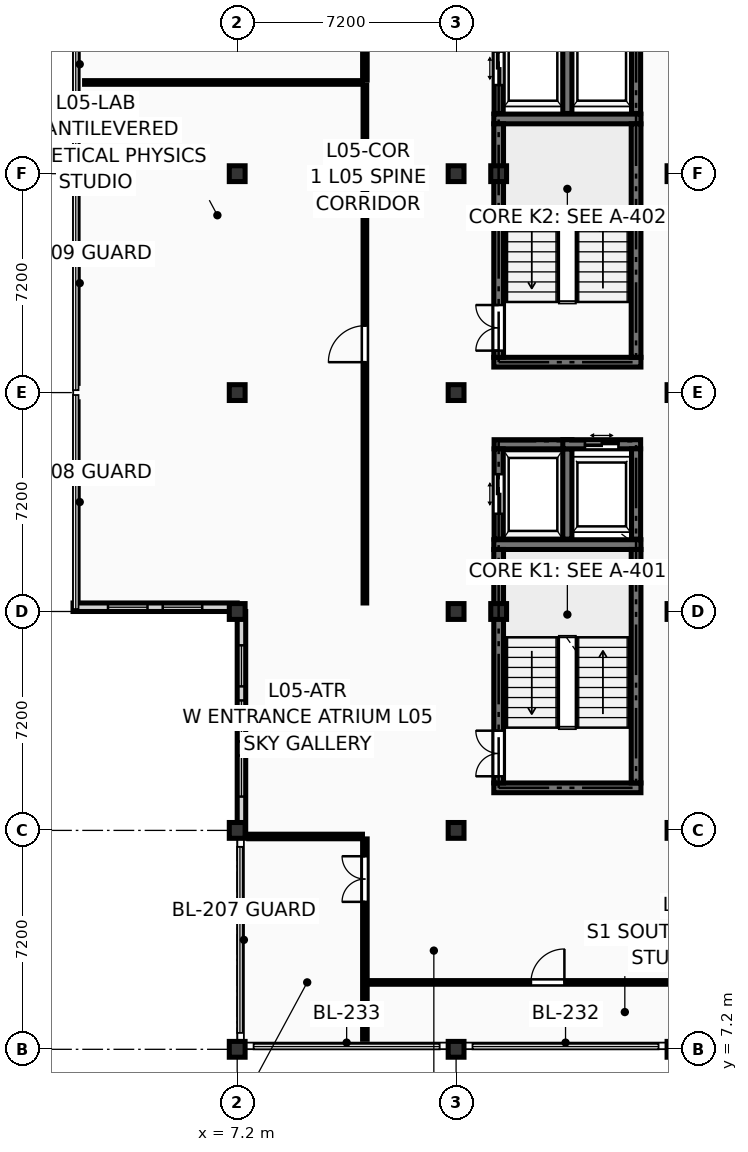
"""IFC4 building model, lengths in metres.
Left out: names, types, materials, properties, quantities, classifications, styles, units other than length and angle.
Written with IfcOpenShell. Run it as: python <this file> out.ifc"""

import sys

from ifc_helpers import new_model, si_unit, direction, frame, frame_2d, origin, origin_2d, place, context, subcontext, project, spatial, rectangle, extrude, element, fill, save


model = new_model("IFC4")
c1 = context("Model", 3, precision=1e-05, world=origin(), true_north=direction((0.0, 1.0)))
c2 = subcontext(c1, "Body", "Model", "MODEL_VIEW")
j1 = project(units=[si_unit("LENGTHUNIT", "METRE"), si_unit("PLANEANGLEUNIT", "RADIAN")], contexts=[c1])
p1 = place(None, origin())
s1 = spatial("IfcSite", under=j1, at=p1, CompositionType="ELEMENT")
p2 = place(p1, origin())
s2 = spatial("IfcBuilding", under=s1, at=p2, CompositionType="ELEMENT")
p3 = place(p2, frame((0.0, 0.0, 19.35)))
s3 = spatial("IfcBuildingStorey", under=s2, at=p3, CompositionType="ELEMENT", Elevation=19.35)
for number, where, z_axis, x_axis in (
    (1, (7.2, 7.2, 0.0), (0.0, 0.0, 1.0), (1.0, 0.0, 0.0)),
    (2, (7.2, 14.4, 0.0), (0.0, 0.0, 1.0), (1.0, 0.0, 0.0)),
    (3, (7.2, 21.6, 0.0), (0.0, 0.0, 1.0), (1.0, 0.0, 0.0)),
    (4, (7.2, 28.8, 0.0), (0.0, 0.0, 1.0), (1.0, 0.0, 0.0)),
    (5, (7.2, 36.0, 0.0), (0.0, 0.0, 1.0), (1.0, 0.0, 0.0)),
    (6, (14.4, 7.2, 0.0), (0.0, 0.0, 1.0), (1.0, 0.0, 0.0)),
    (7, (14.4, 14.4, 0.0), (0.0, 0.0, 1.0), (1.0, 0.0, 0.0)),
    (8, (14.4, 21.6, 0.0), (0.0, 0.0, 1.0), (1.0, 0.0, 0.0)),
    (9, (14.4, 28.8, 0.0), (0.0, 0.0, 1.0), (1.0, 0.0, 0.0)),
    (10, (14.4, 36.0, 0.0), (0.0, 0.0, 1.0), (1.0, 0.0, 0.0)),
    (11, (15.8, 21.6, 0.0), (0.0, 0.0, 1.0), (1.0, 0.0, 0.0)),
    (12, (15.8, 36.0, 0.0), (0.0, 0.0, 1.0), (1.0, 0.0, 0.0)),
    (13, (21.6, 7.2, 0.0), (0.0, 0.0, 1.0), (1.0, 0.0, 0.0)),
    (14, (21.6, 14.4, 0.0), (0.0, 0.0, 1.0), (1.0, 0.0, 0.0)),
    (15, (21.6, 21.6, 0.0), (0.0, 0.0, 1.0), (1.0, 0.0, 0.0)),
    (16, (21.6, 28.8, 0.0), (0.0, 0.0, 1.0), (1.0, 0.0, 0.0)),
    (17, (21.6, 36.0, 0.0), (0.0, 0.0, 1.0), (1.0, 0.0, 0.0)),
):
    element("IfcColumn", number, at=place(p3, frame(where, z_axis=z_axis, x_axis=x_axis)), inside=s3, PredefinedType="COLUMN", context=c2, shape_type="SweptSolid", body=[
        extrude(rectangle(XDim=0.52, YDim=0.52, at=origin_2d()), origin(), (0.0, 0.0, 1.0), 3.6),
    ])
p4 = place(p3, frame((7.34, 14.4, 0.0), z_axis=(0.0, 0.0, 1.0), x_axis=(0.0, 1.0, 0.0)))
e18 = element("IfcWall", 18, at=p4, inside=s3, PredefinedType="SOLIDWALL", context=c2, shape_type="SweptSolid", body=[
    extrude(rectangle(XDim=7.2, YDim=0.28, at=frame_2d((3.6, 0.0))), origin(), (0.0, 0.0, 1.0), 2.84),
])
p5 = place(p4, frame((1.113, 0.0, 0.18)))
e19 = element("IfcOpeningElement", 19, at=p5, cuts=e18, PredefinedType="OPENING", context=c2, shape_type="SweptSolid", body=[
    extrude(rectangle(XDim=1.35, YDim=2.45, at=frame_2d((0.675, 1.225))), frame((0.0, 0.152, 0.0), z_axis=(0.0, -1.0, 0.0), x_axis=(1.0, 0.0, 0.0)), (0.0, 0.0, 1.0), 0.304),
])
p6 = place(p4, frame((2.925, 0.0, 0.18)))
e20 = element("IfcOpeningElement", 20, at=p6, cuts=e18, PredefinedType="OPENING", context=c2, shape_type="SweptSolid", body=[
    extrude(rectangle(XDim=1.35, YDim=2.45, at=frame_2d((0.675, 1.225))), frame((0.0, 0.152, 0.0), z_axis=(0.0, -1.0, 0.0), x_axis=(1.0, 0.0, 0.0)), (0.0, 0.0, 1.0), 0.304),
])
p7 = place(p4, frame((4.738, 0.0, 0.18)))
e21 = element("IfcOpeningElement", 21, at=p7, cuts=e18, PredefinedType="OPENING", context=c2, shape_type="SweptSolid", body=[
    extrude(rectangle(XDim=1.35, YDim=2.45, at=frame_2d((0.675, 1.225))), frame((0.0, 0.152, 0.0), z_axis=(0.0, -1.0, 0.0), x_axis=(1.0, 0.0, 0.0)), (0.0, 0.0, 1.0), 0.304),
])
p8 = place(p3, frame((1.8, 21.74, 0.0), z_axis=(0.0, 0.0, 1.0), x_axis=(1.0, 0.0, 0.0)))
e22 = element("IfcWall", 22, at=p8, inside=s3, PredefinedType="SOLIDWALL", context=c2, shape_type="SweptSolid", body=[
    extrude(rectangle(XDim=5.4, YDim=0.28, at=frame_2d((2.7, 0.0))), origin(), (0.0, 0.0, 1.0), 2.696),
])
p9 = place(p8, frame((1.15, 0.0, 0.18)))
e23 = element("IfcOpeningElement", 23, at=p9, cuts=e22, PredefinedType="OPENING", context=c2, shape_type="SweptSolid", body=[
    extrude(rectangle(XDim=1.3, YDim=2.35, at=frame_2d((0.65, 1.175))), frame((0.0, 0.152, 0.0), z_axis=(0.0, -1.0, 0.0), x_axis=(1.0, 0.0, 0.0)), (0.0, 0.0, 1.0), 0.304),
])
p10 = place(p8, frame((2.95, 0.0, 0.18)))
e24 = element("IfcOpeningElement", 24, at=p10, cuts=e22, PredefinedType="OPENING", context=c2, shape_type="SweptSolid", body=[
    extrude(rectangle(XDim=1.3, YDim=2.35, at=frame_2d((0.65, 1.175))), frame((0.0, 0.152, 0.0), z_axis=(0.0, -1.0, 0.0), x_axis=(1.0, 0.0, 0.0)), (0.0, 0.0, 1.0), 0.304),
])
for number, where, z_axis, x_axis in (
    (25, (15.64, 15.8, 0.0), (0.0, 0.0, 1.0), (1.0, 0.0, 0.0)),
    (26, (15.64, 23.8, 0.0), (0.0, 0.0, 1.0), (1.0, 0.0, 0.0)),
):
    element("IfcWall", number, at=place(p3, frame(where, z_axis=z_axis, x_axis=x_axis)), inside=s3, PredefinedType="SHEAR", context=c2, shape_type="SweptSolid", body=[
        extrude(rectangle(XDim=4.84, YDim=0.32, at=frame_2d((2.42, 0.0))), origin(), (0.0, 0.0, 1.0), 3.39),
    ])
p11 = place(p3, frame((15.8, 15.96, 0.0), z_axis=(0.0, 0.0, 1.0), x_axis=(0.0, 1.0, 0.0)))
e27 = element("IfcWall", 27, at=p11, inside=s3, PredefinedType="SHEAR", context=c2, shape_type="SweptSolid", body=[
    extrude(rectangle(XDim=7.68, YDim=0.32, at=frame_2d((3.84, 0.0))), origin(), (0.0, 0.0, 1.0), 3.39),
])
p12 = place(p11, frame((0.22, 0.0, 0.0)))
e28 = element("IfcOpeningElement", 28, at=p12, cuts=e27, PredefinedType="OPENING", context=c2, shape_type="SweptSolid", body=[
    extrude(rectangle(XDim=1.5, YDim=2.2, at=frame_2d((0.75, 1.1))), frame((0.0, 0.172, 0.0), z_axis=(0.0, -1.0, 0.0), x_axis=(1.0, 0.0, 0.0)), (0.0, 0.0, 1.0), 0.344),
])
p13 = place(p3, frame((20.32, 15.96, 0.0), z_axis=(0.0, 0.0, 1.0), x_axis=(0.0, 1.0, 0.0)))
e29 = element("IfcWall", 29, at=p13, inside=s3, PredefinedType="SHEAR", context=c2, shape_type="SweptSolid", body=[
    extrude(rectangle(XDim=7.68, YDim=0.32, at=frame_2d((3.84, 0.0))), origin(), (0.0, 0.0, 1.0), 3.39),
])
for number, where, z_axis, x_axis in (
    (30, (15.64, 29.8, 0.0), (0.0, 0.0, 1.0), (1.0, 0.0, 0.0)),
    (31, (15.64, 37.8, 0.0), (0.0, 0.0, 1.0), (1.0, 0.0, 0.0)),
):
    element("IfcWall", number, at=place(p3, frame(where, z_axis=z_axis, x_axis=x_axis)), inside=s3, PredefinedType="SHEAR", context=c2, shape_type="SweptSolid", body=[
        extrude(rectangle(XDim=4.84, YDim=0.32, at=frame_2d((2.42, 0.0))), origin(), (0.0, 0.0, 1.0), 3.39),
    ])
p14 = place(p3, frame((15.8, 29.96, 0.0), z_axis=(0.0, 0.0, 1.0), x_axis=(0.0, 1.0, 0.0)))
e32 = element("IfcWall", 32, at=p14, inside=s3, PredefinedType="SHEAR", context=c2, shape_type="SweptSolid", body=[
    extrude(rectangle(XDim=7.68, YDim=0.32, at=frame_2d((3.84, 0.0))), origin(), (0.0, 0.0, 1.0), 3.39),
])
p15 = place(p14, frame((0.22, 0.0, 0.0)))
e33 = element("IfcOpeningElement", 33, at=p15, cuts=e32, PredefinedType="OPENING", context=c2, shape_type="SweptSolid", body=[
    extrude(rectangle(XDim=1.5, YDim=2.2, at=frame_2d((0.75, 1.1))), frame((0.0, 0.172, 0.0), z_axis=(0.0, -1.0, 0.0), x_axis=(1.0, 0.0, 0.0)), (0.0, 0.0, 1.0), 0.344),
])
p16 = place(p3, frame((20.32, 29.96, 0.0), z_axis=(0.0, 0.0, 1.0), x_axis=(0.0, 1.0, 0.0)))
e34 = element("IfcWall", 34, at=p16, inside=s3, PredefinedType="SHEAR", context=c2, shape_type="SweptSolid", body=[
    extrude(rectangle(XDim=7.68, YDim=0.32, at=frame_2d((3.84, 0.0))), origin(), (0.0, 0.0, 1.0), 3.39),
])
p17 = place(p3, frame((15.65, 27.1, 0.0), z_axis=(0.0, 0.0, 1.0), x_axis=(1.0, 0.0, 0.0)))
e35 = element("IfcWall", 35, at=p17, inside=s3, PredefinedType="SHEAR", context=c2, shape_type="SweptSolid", body=[
    extrude(rectangle(XDim=2.56, YDim=0.3, at=frame_2d((1.28, 0.0))), origin(), (0.0, 0.0, 1.0), 3.39),
])
p18 = place(p3, frame((15.8, 23.98, 0.0), z_axis=(0.0, 0.0, 1.0), x_axis=(0.0, 1.0, 0.0)))
e36 = element("IfcWall", 36, at=p18, inside=s3, PredefinedType="SHEAR", context=c2, shape_type="SweptSolid", body=[
    extrude(rectangle(XDim=2.97, YDim=0.3, at=frame_2d((1.485, 0.0))), origin(), (0.0, 0.0, 1.0), 3.39),
])
p19 = place(p18, frame((0.835, 0.0, 0.0)))
e37 = element("IfcOpeningElement", 37, at=p19, cuts=e36, PredefinedType="OPENING", context=c2, shape_type="SweptSolid", body=[
    extrude(rectangle(XDim=1.3, YDim=2.25, at=frame_2d((0.65, 1.125))), frame((0.0, 0.162, 0.0), z_axis=(0.0, -1.0, 0.0), x_axis=(1.0, 0.0, 0.0)), (0.0, 0.0, 1.0), 0.324),
])
p20 = place(p3, frame((18.06, 23.98, 0.0), z_axis=(0.0, 0.0, 1.0), x_axis=(0.0, 1.0, 0.0)))
e38 = element("IfcWall", 38, at=p20, inside=s3, PredefinedType="SHEAR", context=c2, shape_type="SweptSolid", body=[
    extrude(rectangle(XDim=2.97, YDim=0.3, at=frame_2d((1.485, 0.0))), origin(), (0.0, 0.0, 1.0), 3.39),
])
p21 = place(p3, frame((17.91, 27.1, 0.0), z_axis=(0.0, 0.0, 1.0), x_axis=(1.0, 0.0, 0.0)))
e39 = element("IfcWall", 39, at=p21, inside=s3, PredefinedType="SHEAR", context=c2, shape_type="SweptSolid", body=[
    extrude(rectangle(XDim=2.56, YDim=0.3, at=frame_2d((1.28, 0.0))), origin(), (0.0, 0.0, 1.0), 3.39),
])
p22 = place(p21, frame((0.73, 0.0, 0.0)))
e40 = element("IfcOpeningElement", 40, at=p22, cuts=e39, PredefinedType="OPENING", context=c2, shape_type="SweptSolid", body=[
    extrude(rectangle(XDim=1.1, YDim=2.2, at=frame_2d((0.55, 1.1))), frame((0.0, 0.162, 0.0), z_axis=(0.0, -1.0, 0.0), x_axis=(1.0, 0.0, 0.0)), (0.0, 0.0, 1.0), 0.324),
])
p23 = place(p3, frame((20.32, 23.98, 0.0), z_axis=(0.0, 0.0, 1.0), x_axis=(0.0, 1.0, 0.0)))
e41 = element("IfcWall", 41, at=p23, inside=s3, PredefinedType="SHEAR", context=c2, shape_type="SweptSolid", body=[
    extrude(rectangle(XDim=2.97, YDim=0.3, at=frame_2d((1.485, 0.0))), origin(), (0.0, 0.0, 1.0), 3.39),
])
p24 = place(p3, frame((15.8, 37.98, 0.0), z_axis=(0.0, 0.0, 1.0), x_axis=(0.0, 1.0, 0.0)))
e42 = element("IfcWall", 42, at=p24, inside=s3, PredefinedType="SHEAR", context=c2, shape_type="SweptSolid", body=[
    extrude(rectangle(XDim=2.97, YDim=0.3, at=frame_2d((1.485, 0.0))), origin(), (0.0, 0.0, 1.0), 3.39),
])
p25 = place(p24, frame((0.935, 0.0, 0.0)))
e43 = element("IfcOpeningElement", 43, at=p25, cuts=e42, PredefinedType="OPENING", context=c2, shape_type="SweptSolid", body=[
    extrude(rectangle(XDim=1.1, YDim=2.2, at=frame_2d((0.55, 1.1))), frame((0.0, 0.162, 0.0), z_axis=(0.0, -1.0, 0.0), x_axis=(1.0, 0.0, 0.0)), (0.0, 0.0, 1.0), 0.324),
])
for number, where, z_axis, x_axis in (
    (44, (18.06, 37.98, 0.0), (0.0, 0.0, 1.0), (0.0, 1.0, 0.0)),
    (45, (20.32, 37.98, 0.0), (0.0, 0.0, 1.0), (0.0, 1.0, 0.0)),
):
    element("IfcWall", number, at=place(p3, frame(where, z_axis=z_axis, x_axis=x_axis)), inside=s3, PredefinedType="SHEAR", context=c2, shape_type="SweptSolid", body=[
        extrude(rectangle(XDim=2.97, YDim=0.3, at=frame_2d((1.485, 0.0))), origin(), (0.0, 0.0, 1.0), 3.39),
    ])
p26 = place(p3, frame((11.4, 7.53, 0.0), z_axis=(0.0, 0.0, 1.0), x_axis=(0.0, 1.0, 0.0)))
e46 = element("IfcWall", 46, at=p26, inside=s3, PredefinedType="PARTITIONING", context=c2, shape_type="SweptSolid", body=[
    extrude(rectangle(XDim=6.59, YDim=0.15, at=frame_2d((3.295, 0.0))), origin(), (0.0, 0.0, 1.0), 3.375),
])
p27 = place(p26, frame((4.52, 0.0, 0.0)))
e47 = element("IfcOpeningElement", 47, at=p27, cuts=e46, PredefinedType="OPENING", context=c2, shape_type="SweptSolid", body=[
    extrude(rectangle(XDim=1.5, YDim=2.2, at=frame_2d((0.75, 1.1))), frame((0.0, 0.087, 0.0), z_axis=(0.0, -1.0, 0.0), x_axis=(1.0, 0.0, 0.0)), (0.0, 0.0, 1.0), 0.174),
])
p28 = place(p3, frame((7.58, 14.2, 0.0), z_axis=(0.0, 0.0, 1.0), x_axis=(1.0, 0.0, 0.0)))
e48 = element("IfcWall", 48, at=p28, inside=s3, PredefinedType="PARTITIONING", context=c2, shape_type="SweptSolid", body=[
    extrude(rectangle(XDim=3.74, YDim=0.15, at=frame_2d((1.87, 0.0))), origin(), (0.0, 0.0, 1.0), 2.691),
])
p29 = place(p3, frame((11.515, 9.4, 0.0), z_axis=(0.0, 0.0, 1.0), x_axis=(1.0, 0.0, 0.0)))
e49 = element("IfcWall", 49, at=p29, inside=s3, PredefinedType="PARTITIONING", context=c2, shape_type="SweptSolid", body=[
    extrude(rectangle(XDim=16.905, YDim=0.12, at=frame_2d((8.453, 0.0))), origin(), (0.0, 0.0, 1.0), 3.375),
])
p30 = place(p29, frame((5.347, 0.0, 0.0)))
e50 = element("IfcOpeningElement", 50, at=p30, cuts=e49, PredefinedType="OPENING", context=c2, shape_type="SweptSolid", body=[
    extrude(rectangle(XDim=1.1, YDim=2.15, at=frame_2d((0.55, 1.075))), frame((0.0, 0.072, 0.0), z_axis=(0.0, -1.0, 0.0), x_axis=(1.0, 0.0, 0.0)), (0.0, 0.0, 1.0), 0.144),
])
p31 = place(p3, frame((11.4, 21.88, 0.0), z_axis=(0.0, 0.0, 1.0), x_axis=(0.0, 1.0, 0.0)))
e51 = element("IfcWall", 51, at=p31, inside=s3, PredefinedType="PARTITIONING", context=c2, shape_type="SweptSolid", body=[
    extrude(rectangle(XDim=17.04, YDim=0.12, at=frame_2d((8.52, 0.0))), origin(), (0.0, 0.0, 1.0), 3.375),
])
p32 = place(p31, frame((7.92, 0.0, 0.0)))
e52 = element("IfcOpeningElement", 52, at=p32, cuts=e51, PredefinedType="OPENING", context=c2, shape_type="SweptSolid", body=[
    extrude(rectangle(XDim=1.2, YDim=2.15, at=frame_2d((0.6, 1.075))), frame((0.0, 0.072, 0.0), z_axis=(0.0, -1.0, 0.0), x_axis=(1.0, 0.0, 0.0)), (0.0, 0.0, 1.0), 0.144),
])
p33 = place(p3, frame((2.18, 39.0, 0.0), z_axis=(0.0, 0.0, 1.0), x_axis=(1.0, 0.0, 0.0)))
e53 = element("IfcWall", 53, at=p33, inside=s3, PredefinedType="PARTITIONING", context=c2, shape_type="SweptSolid", body=[
    extrude(rectangle(XDim=9.14, YDim=0.12, at=frame_2d((4.57, 0.0))), origin(), (0.0, 0.0, 1.0), 3.375),
])
p34 = place(p3, frame((11.4, 39.08, 0.0), z_axis=(0.0, 0.0, 1.0), x_axis=(0.0, 1.0, 0.0)))
e54 = element("IfcWall", 54, at=p34, inside=s3, PredefinedType="PARTITIONING", context=c2, shape_type="SweptSolid", body=[
    extrude(rectangle(XDim=16.84, YDim=0.15, at=frame_2d((8.42, 0.0))), origin(), (0.0, 0.0, 1.0), 3.375),
])
p35 = place(p34, frame((7.67, 0.0, 0.0)))
e55 = element("IfcOpeningElement", 55, at=p35, cuts=e54, PredefinedType="OPENING", context=c2, shape_type="SweptSolid", body=[
    extrude(rectangle(XDim=1.5, YDim=2.2, at=frame_2d((0.75, 1.1))), frame((0.0, 0.087, 0.0), z_axis=(0.0, -1.0, 0.0), x_axis=(1.0, 0.0, 0.0)), (0.0, 0.0, 1.0), 0.174),
])
p36 = place(p5, origin())
e56 = element("IfcWindow", 56, at=p36, inside=s3, PartitioningType="SINGLE_PANEL", PredefinedType="WINDOW", context=c2, shape_type="SweptSolid", body=[
    extrude(rectangle(XDim=1.35, YDim=2.45, at=frame_2d((0.675, 1.225))), frame((0.0, 0.03, 0.0), z_axis=(0.0, -1.0, 0.0), x_axis=(1.0, 0.0, 0.0)), (0.0, 0.0, 1.0), 0.06),
])
fill(e19, e56)
p37 = place(p6, origin())
e57 = element("IfcWindow", 57, at=p37, inside=s3, PartitioningType="SINGLE_PANEL", PredefinedType="WINDOW", context=c2, shape_type="SweptSolid", body=[
    extrude(rectangle(XDim=1.35, YDim=2.45, at=frame_2d((0.675, 1.225))), frame((0.0, 0.03, 0.0), z_axis=(0.0, -1.0, 0.0), x_axis=(1.0, 0.0, 0.0)), (0.0, 0.0, 1.0), 0.06),
])
fill(e20, e57)
p38 = place(p7, origin())
e58 = element("IfcWindow", 58, at=p38, inside=s3, PartitioningType="SINGLE_PANEL", PredefinedType="WINDOW", context=c2, shape_type="SweptSolid", body=[
    extrude(rectangle(XDim=1.35, YDim=2.45, at=frame_2d((0.675, 1.225))), frame((0.0, 0.03, 0.0), z_axis=(0.0, -1.0, 0.0), x_axis=(1.0, 0.0, 0.0)), (0.0, 0.0, 1.0), 0.06),
])
fill(e21, e58)
p39 = place(p9, origin())
e59 = element("IfcWindow", 59, at=p39, inside=s3, PartitioningType="SINGLE_PANEL", PredefinedType="WINDOW", context=c2, shape_type="SweptSolid", body=[
    extrude(rectangle(XDim=1.3, YDim=2.35, at=frame_2d((0.65, 1.175))), frame((0.0, 0.03, 0.0), z_axis=(0.0, -1.0, 0.0), x_axis=(1.0, 0.0, 0.0)), (0.0, 0.0, 1.0), 0.06),
])
fill(e23, e59)
p40 = place(p10, origin())
e60 = element("IfcWindow", 60, at=p40, inside=s3, PartitioningType="SINGLE_PANEL", PredefinedType="WINDOW", context=c2, shape_type="SweptSolid", body=[
    extrude(rectangle(XDim=1.3, YDim=2.35, at=frame_2d((0.65, 1.175))), frame((0.0, 0.03, 0.0), z_axis=(0.0, -1.0, 0.0), x_axis=(1.0, 0.0, 0.0)), (0.0, 0.0, 1.0), 0.06),
])
fill(e24, e60)
p41 = place(p12, origin())
e61 = element("IfcDoor", 61, at=p41, inside=s3, OperationType="DOUBLE_DOOR_SINGLE_SWING", PredefinedType="DOOR", context=c2, shape_type="SweptSolid", body=[
    extrude(rectangle(XDim=1.5, YDim=2.2, at=frame_2d((0.75, 1.1))), frame((0.0, 0.025, 0.0), z_axis=(0.0, -1.0, 0.0), x_axis=(1.0, 0.0, 0.0)), (0.0, 0.0, 1.0), 0.05),
])
fill(e28, e61)
p42 = place(p15, origin())
e62 = element("IfcDoor", 62, at=p42, inside=s3, OperationType="DOUBLE_DOOR_SINGLE_SWING", PredefinedType="DOOR", context=c2, shape_type="SweptSolid", body=[
    extrude(rectangle(XDim=1.5, YDim=2.2, at=frame_2d((0.75, 1.1))), frame((0.0, 0.025, 0.0), z_axis=(0.0, -1.0, 0.0), x_axis=(1.0, 0.0, 0.0)), (0.0, 0.0, 1.0), 0.05),
])
fill(e33, e62)
p43 = place(p19, origin())
e63 = element("IfcDoor", 63, at=p43, inside=s3, OperationType="DOUBLE_DOOR_SLIDING", PredefinedType="DOOR", context=c2, shape_type="SweptSolid", body=[
    extrude(rectangle(XDim=1.3, YDim=2.25, at=frame_2d((0.65, 1.125))), frame((0.0, 0.025, 0.0), z_axis=(0.0, -1.0, 0.0), x_axis=(1.0, 0.0, 0.0)), (0.0, 0.0, 1.0), 0.05),
])
fill(e37, e63)
p44 = place(p22, origin())
e64 = element("IfcDoor", 64, at=p44, inside=s3, OperationType="DOUBLE_DOOR_SLIDING", PredefinedType="DOOR", context=c2, shape_type="SweptSolid", body=[
    extrude(rectangle(XDim=1.1, YDim=2.2, at=frame_2d((0.55, 1.1))), frame((0.0, 0.025, 0.0), z_axis=(0.0, -1.0, 0.0), x_axis=(1.0, 0.0, 0.0)), (0.0, 0.0, 1.0), 0.05),
])
fill(e40, e64)
p45 = place(p25, origin())
e65 = element("IfcDoor", 65, at=p45, inside=s3, OperationType="DOUBLE_DOOR_SLIDING", PredefinedType="DOOR", context=c2, shape_type="SweptSolid", body=[
    extrude(rectangle(XDim=1.1, YDim=2.2, at=frame_2d((0.55, 1.1))), frame((0.0, 0.025, 0.0), z_axis=(0.0, -1.0, 0.0), x_axis=(1.0, 0.0, 0.0)), (0.0, 0.0, 1.0), 0.05),
])
fill(e43, e65)
p46 = place(p27, origin())
e66 = element("IfcDoor", 66, at=p46, inside=s3, OperationType="DOUBLE_DOOR_SINGLE_SWING", PredefinedType="DOOR", context=c2, shape_type="SweptSolid", body=[
    extrude(rectangle(XDim=1.5, YDim=2.2, at=frame_2d((0.75, 1.1))), frame((0.0, 0.025, 0.0), z_axis=(0.0, -1.0, 0.0), x_axis=(1.0, 0.0, 0.0)), (0.0, 0.0, 1.0), 0.05),
])
fill(e47, e66)
p47 = place(p30, origin())
e67 = element("IfcDoor", 67, at=p47, inside=s3, OperationType="SINGLE_SWING_RIGHT", PredefinedType="DOOR", context=c2, shape_type="SweptSolid", body=[
    extrude(rectangle(XDim=1.1, YDim=2.15, at=frame_2d((0.55, 1.075))), frame((0.0, 0.025, 0.0), z_axis=(0.0, -1.0, 0.0), x_axis=(1.0, 0.0, 0.0)), (0.0, 0.0, 1.0), 0.05),
])
fill(e50, e67)
p48 = place(p32, origin())
e68 = element("IfcDoor", 68, at=p48, inside=s3, OperationType="SINGLE_SWING_LEFT", PredefinedType="DOOR", context=c2, shape_type="SweptSolid", body=[
    extrude(rectangle(XDim=1.2, YDim=2.15, at=frame_2d((0.6, 1.075))), frame((0.0, 0.025, 0.0), z_axis=(0.0, -1.0, 0.0), x_axis=(1.0, 0.0, 0.0)), (0.0, 0.0, 1.0), 0.05),
])
fill(e52, e68)
save(model, sys.argv[1])
